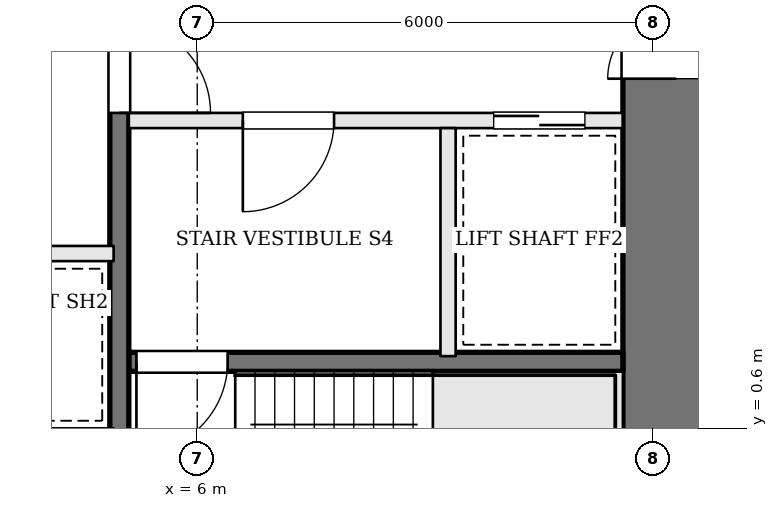
"""IFC4 building model, lengths in metres.
Left out: names, types, materials, properties, quantities, classifications, styles, units other than length and angle.
Written with IfcOpenShell. Run it as: python <this file> out.ifc"""

import sys

from ifc_helpers import new_model, si_unit, direction, frame, frame_2d, origin, place, context, subcontext, project, spatial, rectangle, extrude, element, fill, save


model = new_model("IFC4")
c1 = context("Model", 3, precision=1e-05, world=origin(), true_north=direction((0.0, 1.0)))
c2 = subcontext(c1, "Body", "Model", "MODEL_VIEW")
j1 = project(units=[si_unit("LENGTHUNIT", "METRE"), si_unit("PLANEANGLEUNIT", "RADIAN")], contexts=[c1])
p1 = place(None, origin())
s1 = spatial("IfcSite", under=j1, at=p1, CompositionType="ELEMENT")
p2 = place(p1, origin())
s2 = spatial("IfcBuilding", under=s1, at=p2, CompositionType="ELEMENT")
p3 = place(p2, frame((0.0, 0.0, 62.7)))
s3 = spatial("IfcBuildingStorey", under=s2, at=p3, CompositionType="ELEMENT", Elevation=62.7)
p4 = place(p3, frame((12.3, -1.6, 0.0), z_axis=(0.0, 0.0, 1.0), x_axis=(0.0, 1.0, 0.0)))
e1 = element("IfcWall", 1, at=p4, inside=s3, PredefinedType="SHEAR", context=c2, shape_type="SweptSolid", body=[
    extrude(rectangle(XDim=12.2, YDim=1.4, at=frame_2d((6.1, 0.0))), origin(), (0.0, 0.0, 1.0), 3.6),
])
p5 = place(p4, frame((6.8, 0.0, 0.0)))
e2 = element("IfcOpeningElement", 2, at=p5, cuts=e1, PredefinedType="OPENING", context=c2, shape_type="SweptSolid", body=[
    extrude(rectangle(XDim=1.8, YDim=2.1, at=frame_2d((0.9, 1.05))), frame((0.0, 0.71, 0.0), z_axis=(0.0, -1.0, 0.0), x_axis=(1.0, 0.0, 0.0)), (0.0, 0.0, 1.0), 1.42),
])
p6 = place(p3, frame((11.6, 4.65, 0.0), z_axis=(0.0, 0.0, 1.0), x_axis=(-1.0, 0.0, 0.0)))
e3 = element("IfcWall", 3, at=p6, inside=s3, PredefinedType="SOLIDWALL", context=c2, shape_type="SweptSolid", body=[
    extrude(rectangle(XDim=6.5, YDim=0.2, at=frame_2d((3.25, 0.0))), origin(), (0.0, 0.0, 1.0), 3.4),
])
p7 = place(p6, frame((3.8, 0.0, 0.0)))
e4 = element("IfcOpeningElement", 4, at=p7, cuts=e3, PredefinedType="OPENING", context=c2, shape_type="SweptSolid", body=[
    extrude(rectangle(XDim=1.2, YDim=2.1, at=frame_2d((0.6, 1.05))), frame((0.0, 0.11, 0.0), z_axis=(0.0, -1.0, 0.0), x_axis=(1.0, 0.0, 0.0)), (0.0, 0.0, 1.0), 0.22),
])
p8 = place(p6, frame((0.5, 0.0, 0.0)))
e5 = element("IfcOpeningElement", 5, at=p8, cuts=e3, PredefinedType="OPENING", context=c2, shape_type="SweptSolid", body=[
    extrude(rectangle(XDim=1.2, YDim=2.1, at=frame_2d((0.6, 1.05))), frame((0.0, 0.11, 0.0), z_axis=(0.0, -1.0, 0.0), x_axis=(1.0, 0.0, 0.0)), (0.0, 0.0, 1.0), 0.22),
])
p9 = place(p3, frame((11.6, 1.475, 0.0), z_axis=(0.0, 0.0, 1.0), x_axis=(-1.0, 0.0, 0.0)))
e6 = element("IfcWall", 6, at=p9, inside=s3, PredefinedType="SOLIDWALL", context=c2, shape_type="SweptSolid", body=[
    extrude(rectangle(XDim=6.5, YDim=0.25, at=frame_2d((3.25, 0.0))), origin(), (0.0, 0.0, 1.0), 3.4),
])
p10 = place(p9, frame((5.2, 0.0, 0.0)))
e7 = element("IfcOpeningElement", 7, at=p10, cuts=e6, PredefinedType="OPENING", context=c2, shape_type="SweptSolid", body=[
    extrude(rectangle(XDim=1.2, YDim=2.1, at=frame_2d((0.6, 1.05))), frame((0.0, 0.135, 0.0), z_axis=(0.0, -1.0, 0.0), x_axis=(1.0, 0.0, 0.0)), (0.0, 0.0, 1.0), 0.27),
])
p11 = place(p3, frame((9.3, 4.55, 0.0), z_axis=(0.0, 0.0, 1.0), x_axis=(0.0, -1.0, 0.0)))
e8 = element("IfcWall", 8, at=p11, inside=s3, PredefinedType="SOLIDWALL", context=c2, shape_type="SweptSolid", body=[
    extrude(rectangle(XDim=3.0, YDim=0.2, at=frame_2d((1.5, 0.0))), origin(), (0.0, 0.0, 1.0), 3.4),
])
p12 = place(p3, frame((4.975, 10.6, 0.0), z_axis=(0.0, 0.0, 1.0), x_axis=(0.0, -1.0, 0.0)))
e9 = element("IfcWall", 9, at=p12, inside=s3, PredefinedType="SOLIDWALL", context=c2, shape_type="SweptSolid", body=[
    extrude(rectangle(XDim=12.2, YDim=0.25, at=frame_2d((6.1, 0.0))), origin(), (0.0, 0.0, 1.0), 3.4),
])
p13 = place(p12, frame((4.65, 0.0, 0.0)))
e10 = element("IfcOpeningElement", 10, at=p13, cuts=e9, PredefinedType="OPENING", context=c2, shape_type="SweptSolid", body=[
    extrude(rectangle(XDim=1.2, YDim=2.1, at=frame_2d((0.6, 1.05))), frame((0.0, 0.135, 0.0), z_axis=(0.0, -1.0, 0.0), x_axis=(1.0, 0.0, 0.0)), (0.0, 0.0, 1.0), 0.27),
])
p14 = place(p3, frame((-4.9, 2.9, 0.0), z_axis=(0.0, 0.0, 1.0), x_axis=(1.0, 0.0, 0.0)))
e11 = element("IfcWall", 11, at=p14, inside=s3, PredefinedType="SOLIDWALL", context=c2, shape_type="SweptSolid", body=[
    extrude(rectangle(XDim=9.8, YDim=0.2, at=frame_2d((4.9, 0.0))), origin(), (0.0, 0.0, 1.0), 3.4),
])
p15 = place(p14, frame((0.675, 0.0, 0.0)))
e12 = element("IfcOpeningElement", 12, at=p15, cuts=e11, PredefinedType="OPENING", context=c2, shape_type="SweptSolid", body=[
    extrude(rectangle(XDim=1.1, YDim=2.1, at=frame_2d((0.55, 1.05))), frame((0.0, 0.11, 0.0), z_axis=(0.0, -1.0, 0.0), x_axis=(1.0, 0.0, 0.0)), (0.0, 0.0, 1.0), 0.22),
])
p16 = place(p14, frame((3.125, 0.0, 0.0)))
e13 = element("IfcOpeningElement", 13, at=p16, cuts=e11, PredefinedType="OPENING", context=c2, shape_type="SweptSolid", body=[
    extrude(rectangle(XDim=1.1, YDim=2.1, at=frame_2d((0.55, 1.05))), frame((0.0, 0.11, 0.0), z_axis=(0.0, -1.0, 0.0), x_axis=(1.0, 0.0, 0.0)), (0.0, 0.0, 1.0), 0.22),
])
p17 = place(p5, origin())
e14 = element("IfcDoor", 14, at=p17, inside=s3, OperationType="DOUBLE_DOOR_SINGLE_SWING", PredefinedType="DOOR", context=c2, shape_type="SweptSolid", body=[
    extrude(rectangle(XDim=1.8, YDim=2.1, at=frame_2d((0.9, 1.05))), frame((0.0, 0.025, 0.0), z_axis=(0.0, -1.0, 0.0), x_axis=(1.0, 0.0, 0.0)), (0.0, 0.0, 1.0), 0.05),
])
fill(e2, e14)
p18 = place(p13, origin())
e15 = element("IfcDoor", 15, at=p18, inside=s3, OperationType="SINGLE_SWING_RIGHT", PredefinedType="DOOR", context=c2, shape_type="SweptSolid", body=[
    extrude(rectangle(XDim=1.2, YDim=2.1, at=frame_2d((0.6, 1.05))), frame((0.0, 0.025, 0.0), z_axis=(0.0, -1.0, 0.0), x_axis=(1.0, 0.0, 0.0)), (0.0, 0.0, 1.0), 0.05),
])
fill(e10, e15)
p19 = place(p7, origin())
e16 = element("IfcDoor", 16, at=p19, inside=s3, OperationType="SINGLE_SWING_RIGHT", PredefinedType="DOOR", context=c2, shape_type="SweptSolid", body=[
    extrude(rectangle(XDim=1.2, YDim=2.1, at=frame_2d((0.6, 1.05))), frame((0.0, 0.025, 0.0), z_axis=(0.0, -1.0, 0.0), x_axis=(1.0, 0.0, 0.0)), (0.0, 0.0, 1.0), 0.05),
])
fill(e4, e16)
p20 = place(p10, origin())
e17 = element("IfcDoor", 17, at=p20, inside=s3, OperationType="SINGLE_SWING_RIGHT", PredefinedType="DOOR", context=c2, shape_type="SweptSolid", body=[
    extrude(rectangle(XDim=1.2, YDim=2.1, at=frame_2d((0.6, 1.05))), frame((0.0, 0.025, 0.0), z_axis=(0.0, -1.0, 0.0), x_axis=(1.0, 0.0, 0.0)), (0.0, 0.0, 1.0), 0.05),
])
fill(e7, e17)
p21 = place(p8, origin())
e18 = element("IfcDoor", 18, at=p21, inside=s3, OperationType="SLIDING_TO_RIGHT", PredefinedType="DOOR", context=c2, shape_type="SweptSolid", body=[
    extrude(rectangle(XDim=1.2, YDim=2.1, at=frame_2d((0.6, 1.05))), frame((0.0, 0.025, 0.0), z_axis=(0.0, -1.0, 0.0), x_axis=(1.0, 0.0, 0.0)), (0.0, 0.0, 1.0), 0.05),
])
fill(e5, e18)
save(model, sys.argv[1])
